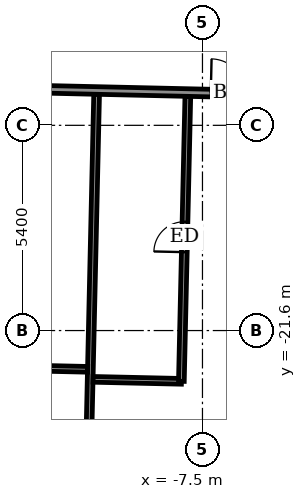
"""IFC4 building model, lengths in metres.
Left out: names, types, materials, properties, quantities, classifications, styles, units other than length and angle.
Written with IfcOpenShell. Run it as: python <this file> out.ifc"""

import sys

from ifc_helpers import new_model, si_unit, direction, frame, frame_2d, origin, place, context, subcontext, project, spatial, rectangle, extrude, element, fill, save


model = new_model("IFC4")
c1 = context("Model", 3, precision=1e-05, world=origin(), true_north=direction((0.0, 1.0)))
c2 = subcontext(c1, "Body", "Model", "MODEL_VIEW")
j1 = project(units=[si_unit("LENGTHUNIT", "METRE"), si_unit("PLANEANGLEUNIT", "RADIAN")], contexts=[c1])
p1 = place(None, origin())
s1 = spatial("IfcSite", under=j1, at=p1, CompositionType="ELEMENT")
p2 = place(p1, origin())
s2 = spatial("IfcBuilding", under=s1, at=p2, CompositionType="ELEMENT")
p3 = place(p2, frame((0.0, 0.0, 56.7)))
s3 = spatial("IfcBuildingStorey", under=s2, at=p3, CompositionType="ELEMENT", Elevation=56.7)
p4 = place(p3, frame((-10.559, -27.481, 0.0), z_axis=(0.0, 0.0, 1.0), x_axis=(0.022658614335, 0.999743260641, 0.0)))
e1 = element("IfcWall", 1, at=p4, inside=s3, PredefinedType="PARTITIONING", context=c2, shape_type="SweptSolid", body=[
    extrude(rectangle(XDim=12.1, YDim=0.15, at=frame_2d((6.05, 0.0))), origin(), (0.0, 0.0, 1.0), 3.05),
])
p5 = place(p3, frame((-10.378, -22.884, 0.0), z_axis=(0.0, 0.0, 1.0), x_axis=(0.999749954681, -0.022361308448, 0.0)))
e2 = element("IfcWall", 2, at=p5, inside=s3, PredefinedType="PARTITIONING", context=c2, shape_type="SweptSolid", body=[
    extrude(rectangle(XDim=2.325, YDim=0.15, at=frame_2d((1.163, 0.0))), origin(), (0.0, 0.0, 1.0), 3.05),
])
p6 = place(p3, frame((-8.055, -22.936, 0.0), z_axis=(0.0, 0.0, 1.0), x_axis=(0.022656334507, 0.999743312309, 0.0)))
e3 = element("IfcWall", 3, at=p6, inside=s3, PredefinedType="PARTITIONING", context=c2, shape_type="SweptSolid", body=[
    extrude(rectangle(XDim=7.5, YDim=0.15, at=frame_2d((3.75, 0.0))), origin(), (0.0, 0.0, 1.0), 3.05),
])
p7 = place(p6, frame((3.4, 0.0, 0.0)))
e4 = element("IfcOpeningElement", 4, at=p7, cuts=e3, PredefinedType="OPENING", context=c2, shape_type="SweptSolid", body=[
    extrude(rectangle(XDim=0.8, YDim=2.1, at=frame_2d((0.4, 1.05))), frame((0.0, 0.085, 0.0), z_axis=(0.0, -1.0, 0.0), x_axis=(1.0, 0.0, 0.0)), (0.0, 0.0, 1.0), 0.17),
])
p8 = place(p3, frame((-12.846, -22.568, 0.0), z_axis=(0.0, 0.0, 1.0), x_axis=(0.999749744571, -0.022370700241, 0.0)))
e5 = element("IfcWall", 5, at=p8, inside=s3, PredefinedType="PARTITIONING", context=c2, shape_type="SweptSolid", body=[
    extrude(rectangle(XDim=2.324, YDim=0.15, at=frame_2d((1.162, 0.0))), origin(), (0.0, 0.0, 1.0), 3.05),
])
p9 = place(p3, frame((-26.126, -14.924, 0.0), z_axis=(0.0, 0.0, 1.0), x_axis=(0.999742687583, -0.0226838847, 0.0)))
e6 = element("IfcWall", 6, at=p9, inside=s3, PredefinedType="PARTITIONING", context=c2, shape_type="SweptSolid", body=[
    extrude(rectangle(XDim=54.836, YDim=0.2, at=frame_2d((27.418, 0.0))), origin(), (0.0, 0.0, 1.0), 3.05),
])
p10 = place(p9, frame((0.775, 0.0, 0.0)))
e7 = element("IfcOpeningElement", 7, at=p10, cuts=e6, PredefinedType="OPENING", context=c2, shape_type="SweptSolid", body=[
    extrude(rectangle(XDim=1.0, YDim=2.1, at=frame_2d((0.5, 1.05))), frame((0.0, 0.11, 0.0), z_axis=(0.0, -1.0, 0.0), x_axis=(1.0, 0.0, 0.0)), (0.0, 0.0, 1.0), 0.22),
])
p11 = place(p9, frame((5.45, 0.0, 0.0)))
e8 = element("IfcOpeningElement", 8, at=p11, cuts=e6, PredefinedType="OPENING", context=c2, shape_type="SweptSolid", body=[
    extrude(rectangle(XDim=0.9, YDim=2.1, at=frame_2d((0.45, 1.05))), frame((0.0, 0.11, 0.0), z_axis=(0.0, -1.0, 0.0), x_axis=(1.0, 0.0, 0.0)), (0.0, 0.0, 1.0), 0.22),
])
p12 = place(p9, frame((10.0, 0.0, 0.0)))
e9 = element("IfcOpeningElement", 9, at=p12, cuts=e6, PredefinedType="OPENING", context=c2, shape_type="SweptSolid", body=[
    extrude(rectangle(XDim=0.9, YDim=2.1, at=frame_2d((0.45, 1.05))), frame((0.0, 0.11, 0.0), z_axis=(0.0, -1.0, 0.0), x_axis=(1.0, 0.0, 0.0)), (0.0, 0.0, 1.0), 0.22),
])
p13 = place(p9, frame((11.975, 0.0, 0.0)))
e10 = element("IfcOpeningElement", 10, at=p13, cuts=e6, PredefinedType="OPENING", context=c2, shape_type="SweptSolid", body=[
    extrude(rectangle(XDim=0.9, YDim=2.1, at=frame_2d((0.45, 1.05))), frame((0.0, 0.11, 0.0), z_axis=(0.0, -1.0, 0.0), x_axis=(1.0, 0.0, 0.0)), (0.0, 0.0, 1.0), 0.22),
])
p14 = place(p9, frame((18.85, 0.0, 0.0)))
e11 = element("IfcOpeningElement", 11, at=p14, cuts=e6, PredefinedType="OPENING", context=c2, shape_type="SweptSolid", body=[
    extrude(rectangle(XDim=0.9, YDim=2.1, at=frame_2d((0.45, 1.05))), frame((0.0, 0.11, 0.0), z_axis=(0.0, -1.0, 0.0), x_axis=(1.0, 0.0, 0.0)), (0.0, 0.0, 1.0), 0.22),
])
p15 = place(p9, frame((20.9, 0.0, 0.0)))
e12 = element("IfcOpeningElement", 12, at=p15, cuts=e6, PredefinedType="OPENING", context=c2, shape_type="SweptSolid", body=[
    extrude(rectangle(XDim=0.9, YDim=2.1, at=frame_2d((0.45, 1.05))), frame((0.0, 0.11, 0.0), z_axis=(0.0, -1.0, 0.0), x_axis=(1.0, 0.0, 0.0)), (0.0, 0.0, 1.0), 0.22),
])
p16 = place(p9, frame((27.725, 0.0, 0.0)))
e13 = element("IfcOpeningElement", 13, at=p16, cuts=e6, PredefinedType="OPENING", context=c2, shape_type="SweptSolid", body=[
    extrude(rectangle(XDim=0.9, YDim=2.1, at=frame_2d((0.45, 1.05))), frame((0.0, 0.11, 0.0), z_axis=(0.0, -1.0, 0.0), x_axis=(1.0, 0.0, 0.0)), (0.0, 0.0, 1.0), 0.22),
])
p17 = place(p9, frame((29.7, 0.0, 0.0)))
e14 = element("IfcOpeningElement", 14, at=p17, cuts=e6, PredefinedType="OPENING", context=c2, shape_type="SweptSolid", body=[
    extrude(rectangle(XDim=0.9, YDim=2.1, at=frame_2d((0.45, 1.05))), frame((0.0, 0.11, 0.0), z_axis=(0.0, -1.0, 0.0), x_axis=(1.0, 0.0, 0.0)), (0.0, 0.0, 1.0), 0.22),
])
p18 = place(p9, frame((36.5, 0.0, 0.0)))
e15 = element("IfcOpeningElement", 15, at=p18, cuts=e6, PredefinedType="OPENING", context=c2, shape_type="SweptSolid", body=[
    extrude(rectangle(XDim=0.9, YDim=2.1, at=frame_2d((0.45, 1.05))), frame((0.0, 0.11, 0.0), z_axis=(0.0, -1.0, 0.0), x_axis=(1.0, 0.0, 0.0)), (0.0, 0.0, 1.0), 0.22),
])
p19 = place(p9, frame((38.525, 0.0, 0.0)))
e16 = element("IfcOpeningElement", 16, at=p19, cuts=e6, PredefinedType="OPENING", context=c2, shape_type="SweptSolid", body=[
    extrude(rectangle(XDim=0.9, YDim=2.1, at=frame_2d((0.45, 1.05))), frame((0.0, 0.11, 0.0), z_axis=(0.0, -1.0, 0.0), x_axis=(1.0, 0.0, 0.0)), (0.0, 0.0, 1.0), 0.22),
])
p20 = place(p9, frame((45.325, 0.0, 0.0)))
e17 = element("IfcOpeningElement", 17, at=p20, cuts=e6, PredefinedType="OPENING", context=c2, shape_type="SweptSolid", body=[
    extrude(rectangle(XDim=0.9, YDim=2.1, at=frame_2d((0.45, 1.05))), frame((0.0, 0.11, 0.0), z_axis=(0.0, -1.0, 0.0), x_axis=(1.0, 0.0, 0.0)), (0.0, 0.0, 1.0), 0.22),
])
p21 = place(p9, frame((52.593, 0.0, 0.0)))
e18 = element("IfcOpeningElement", 18, at=p21, cuts=e6, PredefinedType="OPENING", context=c2, shape_type="SweptSolid", body=[
    extrude(rectangle(XDim=1.0, YDim=2.1, at=frame_2d((0.5, 1.05))), frame((0.0, 0.11, 0.0), z_axis=(0.0, -1.0, 0.0), x_axis=(1.0, 0.0, 0.0)), (0.0, 0.0, 1.0), 0.22),
])
p22 = place(p9, frame((47.55, 0.0, 0.0)))
e19 = element("IfcOpeningElement", 19, at=p22, cuts=e6, PredefinedType="OPENING", context=c2, shape_type="SweptSolid", body=[
    extrude(rectangle(XDim=0.9, YDim=2.1, at=frame_2d((0.45, 1.05))), frame((0.0, 0.11, 0.0), z_axis=(0.0, -1.0, 0.0), x_axis=(1.0, 0.0, 0.0)), (0.0, 0.0, 1.0), 0.22),
])
p23 = place(p14, origin())
e20 = element("IfcDoor", 20, at=p23, inside=s3, OperationType="SINGLE_SWING_LEFT", PredefinedType="DOOR", context=c2, shape_type="SweptSolid", body=[
    extrude(rectangle(XDim=0.9, YDim=2.1, at=frame_2d((0.45, 1.05))), frame((0.0, 0.025, 0.0), z_axis=(0.0, -1.0, 0.0), x_axis=(1.0, 0.0, 0.0)), (0.0, 0.0, 1.0), 0.05),
])
fill(e11, e20)
p24 = place(p7, origin())
e21 = element("IfcDoor", 21, at=p24, inside=s3, OperationType="SINGLE_SWING_LEFT", PredefinedType="DOOR", context=c2, shape_type="SweptSolid", body=[
    extrude(rectangle(XDim=0.8, YDim=2.1, at=frame_2d((0.4, 1.05))), frame((0.0, 0.025, 0.0), z_axis=(0.0, -1.0, 0.0), x_axis=(1.0, 0.0, 0.0)), (0.0, 0.0, 1.0), 0.05),
])
fill(e4, e21)
save(model, sys.argv[1])
